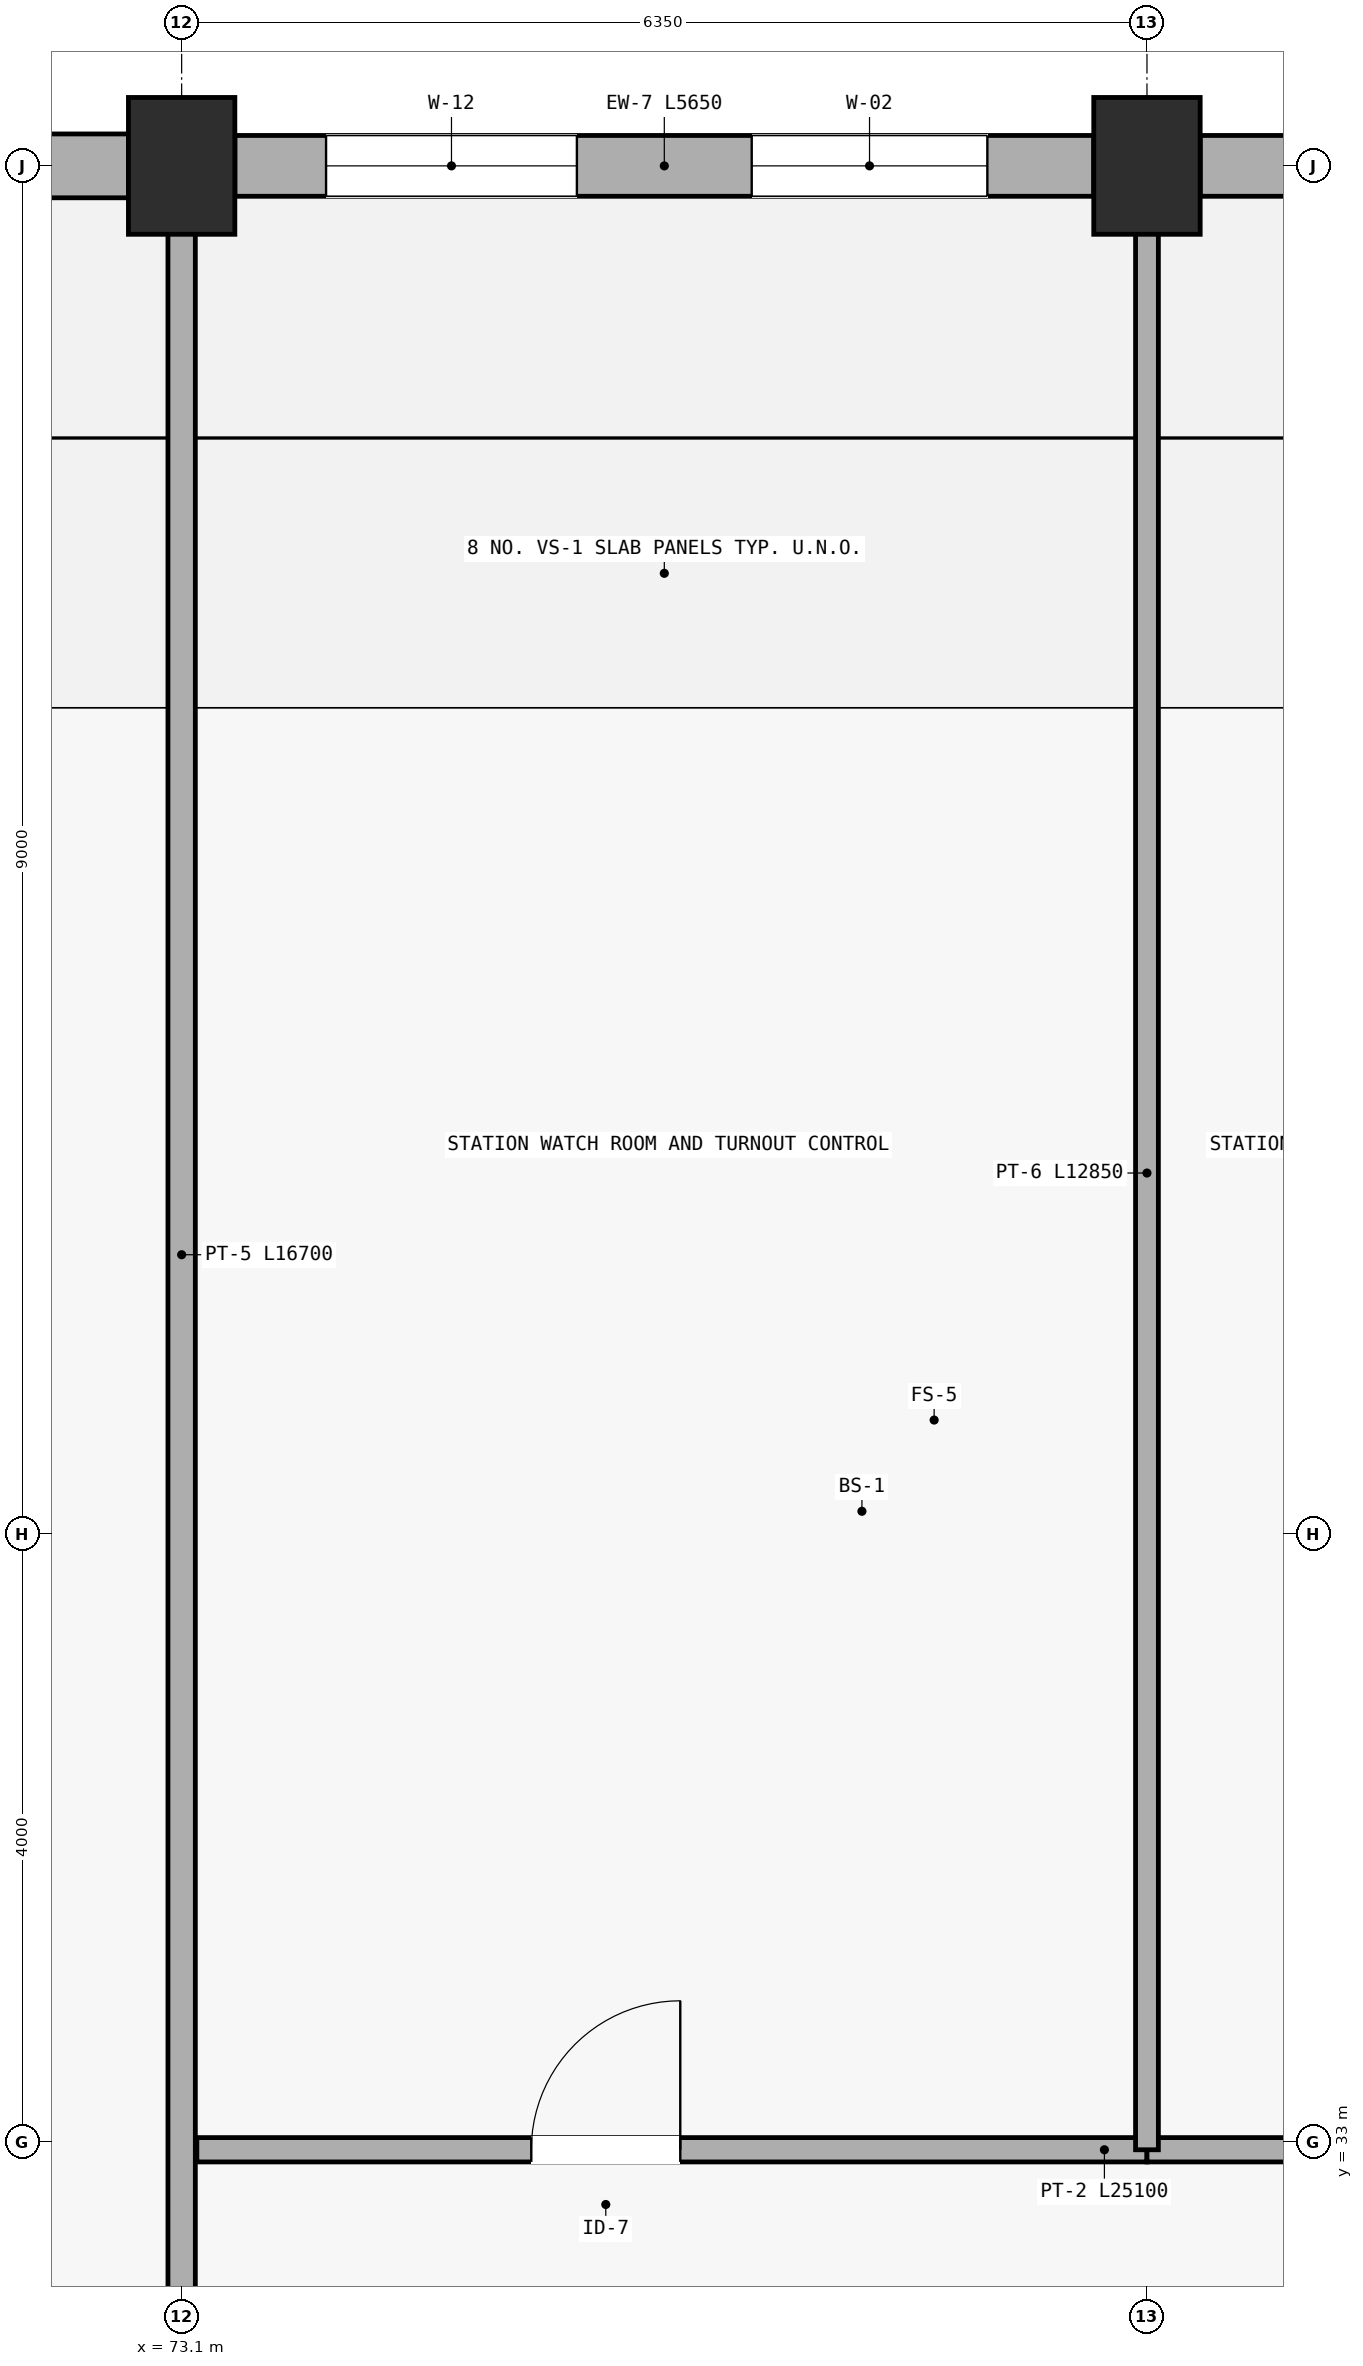
"""IFC4 building model, lengths in metres.
Left out: names, types, materials, properties, quantities, classifications, styles, units other than length and angle.
Written with IfcOpenShell. Run it as: python <this file> out.ifc"""

import sys

from ifc_helpers import new_model, si_unit, direction, frame, frame_2d, origin, origin_2d, place, context, subcontext, project, spatial, rectangle, extrude, element, fill, save


model = new_model("IFC4")
c1 = context("Model", 3, precision=1e-05, world=origin(), true_north=direction((0.0, 1.0)))
c2 = subcontext(c1, "Body", "Model", "MODEL_VIEW")
j1 = project(units=[si_unit("LENGTHUNIT", "METRE"), si_unit("PLANEANGLEUNIT", "RADIAN")], contexts=[c1])
p1 = place(None, origin())
s1 = spatial("IfcSite", under=j1, at=p1, CompositionType="ELEMENT")
p2 = place(p1, origin())
s2 = spatial("IfcBuilding", under=s1, at=p2, CompositionType="ELEMENT")
p3 = place(p2, origin())
s3 = spatial("IfcBuildingStorey", under=s2, at=p3, CompositionType="ELEMENT", Elevation=0.0)
for number, where, z_axis, x_axis in (
    (1, (73.1, 46.0, 0.0), (0.0, 0.0, 1.0), (1.0, 0.0, 0.0)),
    (2, (79.45, 46.0, 0.0), (0.0, 0.0, 1.0), (1.0, 0.0, 0.0)),
):
    element("IfcColumn", number, at=place(p3, frame(where, z_axis=z_axis, x_axis=x_axis)), inside=s3, PredefinedType="COLUMN", context=c2, shape_type="SweptSolid", body=[
        extrude(rectangle(XDim=0.7, YDim=0.9, at=origin_2d()), origin(), (0.0, 0.0, 1.0), 5.65),
    ])
p4 = place(p3, frame((72.75, 46.0, 0.0), z_axis=(0.0, 0.0, 1.0), x_axis=(-1.0, 0.0, 0.0)))
e3 = element("IfcWall", 3, at=p4, inside=s3, PredefinedType="STANDARD", context=c2, shape_type="SweptSolid", body=[
    extrude(rectangle(XDim=5.65, YDim=0.42, at=frame_2d((2.825, 0.0))), origin(), (0.0, 0.0, 1.0), 4.84),
])
p5 = place(p4, frame((0.675, 0.0, 0.0)))
e4 = element("IfcOpeningElement", 4, at=p5, cuts=e3, PredefinedType="OPENING", context=c2, shape_type="SweptSolid", body=[
    extrude(rectangle(XDim=4.3, YDim=4.4, at=frame_2d((2.15, 2.2))), frame((0.0, 0.22, 0.0), z_axis=(0.0, -1.0, 0.0), x_axis=(1.0, 0.0, 0.0)), (0.0, 0.0, 1.0), 0.44),
])
p6 = place(p3, frame((79.1, 46.0, 0.0), z_axis=(0.0, 0.0, 1.0), x_axis=(-1.0, 0.0, 0.0)))
e5 = element("IfcWall", 5, at=p6, inside=s3, PredefinedType="STANDARD", context=c2, shape_type="SweptSolid", body=[
    extrude(rectangle(XDim=5.65, YDim=0.4, at=frame_2d((2.825, 0.0))), origin(), (0.0, 0.0, 1.0), 3.8),
])
p7 = place(p6, frame((0.7, 0.0, 0.95)))
e6 = element("IfcOpeningElement", 6, at=p7, cuts=e5, PredefinedType="OPENING", context=c2, shape_type="SweptSolid", body=[
    extrude(rectangle(XDim=1.55, YDim=1.55, at=frame_2d((0.775, 0.775))), frame((0.0, 0.21, 0.0), z_axis=(0.0, -1.0, 0.0), x_axis=(1.0, 0.0, 0.0)), (0.0, 0.0, 1.0), 0.42),
])
p8 = place(p6, frame((3.4, 0.0, 0.95)))
e7 = element("IfcOpeningElement", 7, at=p8, cuts=e5, PredefinedType="OPENING", context=c2, shape_type="SweptSolid", body=[
    extrude(rectangle(XDim=1.65, YDim=1.45, at=frame_2d((0.825, 0.725))), frame((0.0, 0.21, 0.0), z_axis=(0.0, -1.0, 0.0), x_axis=(1.0, 0.0, 0.0)), (0.0, 0.0, 1.0), 0.42),
])
p9 = place(p3, frame((85.45, 46.0, 0.0), z_axis=(0.0, 0.0, 1.0), x_axis=(-1.0, 0.0, 0.0)))
e8 = element("IfcWall", 8, at=p9, inside=s3, PredefinedType="STANDARD", context=c2, shape_type="SweptSolid", body=[
    extrude(rectangle(XDim=5.65, YDim=0.4, at=frame_2d((2.825, 0.0))), origin(), (0.0, 0.0, 1.0), 3.8),
])
p10 = place(p9, frame((0.7, 0.0, 0.95)))
e9 = element("IfcOpeningElement", 9, at=p10, cuts=e8, PredefinedType="OPENING", context=c2, shape_type="SweptSolid", body=[
    extrude(rectangle(XDim=1.55, YDim=1.55, at=frame_2d((0.775, 0.775))), frame((0.0, 0.21, 0.0), z_axis=(0.0, -1.0, 0.0), x_axis=(1.0, 0.0, 0.0)), (0.0, 0.0, 1.0), 0.42),
])
p11 = place(p9, frame((3.4, 0.0, 0.95)))
e10 = element("IfcOpeningElement", 10, at=p11, cuts=e8, PredefinedType="OPENING", context=c2, shape_type="SweptSolid", body=[
    extrude(rectangle(XDim=1.65, YDim=1.45, at=frame_2d((0.825, 0.725))), frame((0.0, 0.21, 0.0), z_axis=(0.0, -1.0, 0.0), x_axis=(1.0, 0.0, 0.0)), (0.0, 0.0, 1.0), 0.42),
])
p12 = place(p3, frame((73.1, 29.1, 0.0), z_axis=(0.0, 0.0, 1.0), x_axis=(0.0, 1.0, 0.0)))
e11 = element("IfcWall", 11, at=p12, inside=s3, PredefinedType="PARTITIONING", context=c2, shape_type="SweptSolid", body=[
    extrude(rectangle(XDim=16.7, YDim=0.18, at=frame_2d((8.35, 0.0))), origin(), (0.0, 0.0, 1.0), 3.928),
])
p13 = place(p12, frame((1.4, 0.0, 0.0)))
e12 = element("IfcOpeningElement", 12, at=p13, cuts=e11, PredefinedType="OPENING", context=c2, shape_type="SweptSolid", body=[
    extrude(rectangle(XDim=1.05, YDim=2.14, at=frame_2d((0.525, 1.07))), frame((0.0, 0.1, 0.0), z_axis=(0.0, -1.0, 0.0), x_axis=(1.0, 0.0, 0.0)), (0.0, 0.0, 1.0), 0.2),
])
p14 = place(p3, frame((73.2, 32.95, 0.0), z_axis=(0.0, 0.0, 1.0), x_axis=(1.0, 0.0, 0.0)))
e13 = element("IfcWall", 13, at=p14, inside=s3, PredefinedType="PARTITIONING", context=c2, shape_type="SweptSolid", body=[
    extrude(rectangle(XDim=6.25, YDim=0.16, at=frame_2d((3.125, 0.0))), origin(), (0.0, 0.0, 1.0), 4.4),
])
p15 = place(p14, frame((2.2, 0.0, 0.0)))
e14 = element("IfcOpeningElement", 14, at=p15, cuts=e13, PredefinedType="OPENING", context=c2, shape_type="SweptSolid", body=[
    extrude(rectangle(XDim=0.98, YDim=2.12, at=frame_2d((0.49, 1.06))), frame((0.0, 0.09, 0.0), z_axis=(0.0, -1.0, 0.0), x_axis=(1.0, 0.0, 0.0)), (0.0, 0.0, 1.0), 0.18),
])
p16 = place(p3, frame((79.45, 32.95, 0.0), z_axis=(0.0, 0.0, 1.0), x_axis=(1.0, 0.0, 0.0)))
e15 = element("IfcWall", 15, at=p16, inside=s3, PredefinedType="PARTITIONING", context=c2, shape_type="SweptSolid", body=[
    extrude(rectangle(XDim=6.35, YDim=0.16, at=frame_2d((3.175, 0.0))), origin(), (0.0, 0.0, 1.0), 4.4),
])
p17 = place(p16, frame((2.2, 0.0, 0.0)))
e16 = element("IfcOpeningElement", 16, at=p17, cuts=e15, PredefinedType="OPENING", context=c2, shape_type="SweptSolid", body=[
    extrude(rectangle(XDim=1.6, YDim=2.14, at=frame_2d((0.8, 1.07))), frame((0.0, 0.09, 0.0), z_axis=(0.0, -1.0, 0.0), x_axis=(1.0, 0.0, 0.0)), (0.0, 0.0, 1.0), 0.18),
])
p18 = place(p3, frame((79.45, 32.95, 0.0), z_axis=(0.0, 0.0, 1.0), x_axis=(0.0, 1.0, 0.0)))
e17 = element("IfcWall", 17, at=p18, inside=s3, PredefinedType="PARTITIONING", context=c2, shape_type="SweptSolid", body=[
    extrude(rectangle(XDim=12.85, YDim=0.15, at=frame_2d((6.425, 0.0))), origin(), (0.0, 0.0, 1.0), 3.928),
])
p19 = place(p7, origin())
e18 = element("IfcWindow", 18, at=p19, inside=s3, PartitioningType="DOUBLE_PANEL_VERTICAL", PredefinedType="WINDOW", context=c2, shape_type="SweptSolid", body=[
    extrude(rectangle(XDim=1.55, YDim=1.55, at=frame_2d((0.775, 0.775))), frame((0.0, 0.03, 0.0), z_axis=(0.0, -1.0, 0.0), x_axis=(1.0, 0.0, 0.0)), (0.0, 0.0, 1.0), 0.06),
])
fill(e6, e18)
p20 = place(p8, origin())
e19 = element("IfcWindow", 19, at=p20, inside=s3, PartitioningType="DOUBLE_PANEL_VERTICAL", PredefinedType="WINDOW", context=c2, shape_type="SweptSolid", body=[
    extrude(rectangle(XDim=1.65, YDim=1.45, at=frame_2d((0.825, 0.725))), frame((0.0, 0.03, 0.0), z_axis=(0.0, -1.0, 0.0), x_axis=(1.0, 0.0, 0.0)), (0.0, 0.0, 1.0), 0.06),
])
fill(e7, e19)
p21 = place(p15, origin())
e20 = element("IfcDoor", 20, at=p21, inside=s3, OperationType="SINGLE_SWING_RIGHT", PredefinedType="DOOR", context=c2, shape_type="SweptSolid", body=[
    extrude(rectangle(XDim=0.98, YDim=2.12, at=frame_2d((0.49, 1.06))), frame((0.0, 0.025, 0.0), z_axis=(0.0, -1.0, 0.0), x_axis=(1.0, 0.0, 0.0)), (0.0, 0.0, 1.0), 0.05),
])
fill(e14, e20)
save(model, sys.argv[1])
